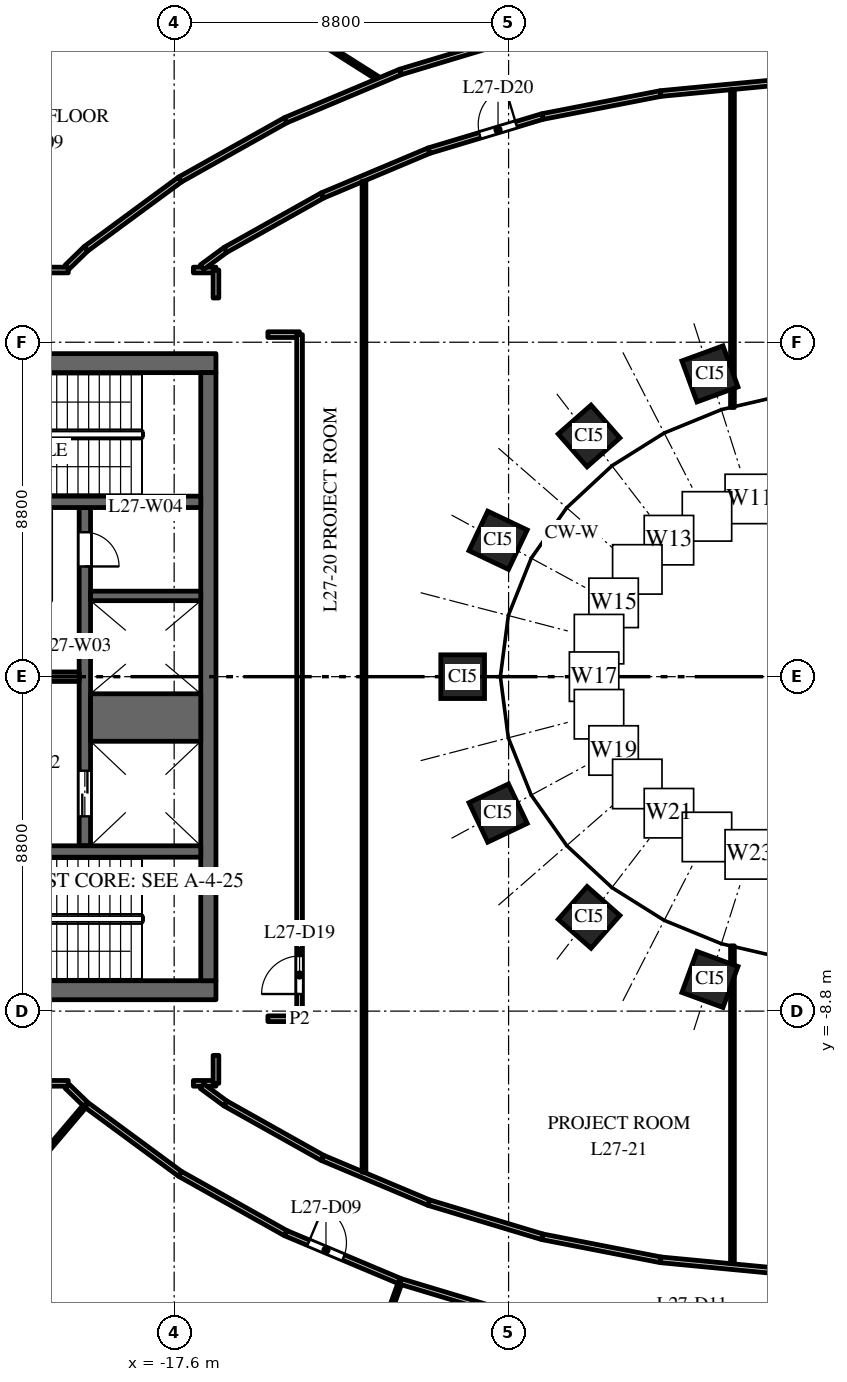
"""IFC4 building model, lengths in metres.
Left out: names, types, materials, properties, quantities, classifications, styles, units other than length and angle.
Written with IfcOpenShell. Run it as: python <this file> out.ifc"""

import sys

from ifc_helpers import new_model, si_unit, direction, frame, frame_2d, origin, origin_2d, place, context, subcontext, project, spatial, rectangle, extrude, element, fill, save


model = new_model("IFC4")
c1 = context("Model", 3, precision=1e-05, world=origin(), true_north=direction((0.0, 1.0)))
c2 = subcontext(c1, "Body", "Model", "MODEL_VIEW")
j1 = project(units=[si_unit("LENGTHUNIT", "METRE"), si_unit("PLANEANGLEUNIT", "RADIAN")], contexts=[c1])
p1 = place(None, origin())
s1 = spatial("IfcSite", under=j1, at=p1, CompositionType="ELEMENT")
p2 = place(p1, origin())
s2 = spatial("IfcBuilding", under=s1, at=p2, CompositionType="ELEMENT")
p3 = place(p2, frame((0.0, 0.0, 120.0)))
s3 = spatial("IfcBuildingStorey", under=s2, at=p3, CompositionType="ELEMENT", Elevation=120.0)
for number, where, z_axis, x_axis in (
    (1, (-3.501, 7.967, 0.0), (0.0, 0.0, 1.0), (-0.939, -0.344, 0.0)),
    (2, (-6.682, 6.334, 0.0), (0.0, 0.0, 1.0), (-0.751, -0.66, 0.0)),
    (3, (-9.076, 3.588, 0.0), (0.0, 0.0, 1.0), (-0.429, -0.903, 0.0)),
    (4, (-10.008, 0.0, 0.0), (0.0, 0.0, 1.0), (0.0, -1.0, 0.0)),
    (5, (-9.076, -3.588, 0.0), (0.0, 0.0, 1.0), (0.429, -0.903, 0.0)),
    (6, (-6.682, -6.334, 0.0), (0.0, 0.0, 1.0), (0.751, -0.66, 0.0)),
    (7, (-3.501, -7.967, 0.0), (0.0, 0.0, 1.0), (0.939, -0.344, 0.0)),
):
    element("IfcColumn", number, at=place(p3, frame(where, z_axis=z_axis, x_axis=x_axis)), inside=s3, PredefinedType="COLUMN", context=c2, shape_type="SweptSolid", body=[
        extrude(rectangle(XDim=1.15, YDim=1.15, at=origin_2d()), origin(), (0.0, 0.0, 1.0), 4.0),
    ])
p4 = place(p3, frame((-16.5, 8.25, 0.0), z_axis=(0.0, 0.0, 1.0), x_axis=(-1.0, 0.0, 0.0)))
e8 = element("IfcWall", 8, at=p4, inside=s3, PredefinedType="SHEAR", context=c2, shape_type="SweptSolid", body=[
    extrude(rectangle(XDim=15.0, YDim=0.5, at=frame_2d((7.5, 0.0))), origin(), (0.0, 0.0, 1.0), 3.7),
])
p5 = place(p4, frame((6.9, 0.0, 0.0)))
e9 = element("IfcOpeningElement", 9, at=p5, cuts=e8, PredefinedType="OPENING", context=c2, shape_type="SweptSolid", body=[
    extrude(rectangle(XDim=1.2, YDim=2.1, at=frame_2d((0.6, 1.05))), frame((0.0, 0.26, 0.0), z_axis=(0.0, -1.0, 0.0), x_axis=(1.0, 0.0, 0.0)), (0.0, 0.0, 1.0), 0.52),
])
p6 = place(p4, frame((12.05, 0.0, 0.0)))
e10 = element("IfcOpeningElement", 10, at=p6, cuts=e8, PredefinedType="OPENING", context=c2, shape_type="SweptSolid", body=[
    extrude(rectangle(XDim=0.9, YDim=2.1, at=frame_2d((0.45, 1.05))), frame((0.0, 0.26, 0.0), z_axis=(0.0, -1.0, 0.0), x_axis=(1.0, 0.0, 0.0)), (0.0, 0.0, 1.0), 0.52),
])
p7 = place(p3, frame((-16.5, -8.25, 0.0), z_axis=(0.0, 0.0, 1.0), x_axis=(-1.0, 0.0, 0.0)))
e11 = element("IfcWall", 11, at=p7, inside=s3, PredefinedType="SHEAR", context=c2, shape_type="SweptSolid", body=[
    extrude(rectangle(XDim=15.0, YDim=0.5, at=frame_2d((7.5, 0.0))), origin(), (0.0, 0.0, 1.0), 3.7),
])
p8 = place(p7, frame((6.9, 0.0, 0.0)))
e12 = element("IfcOpeningElement", 12, at=p8, cuts=e11, PredefinedType="OPENING", context=c2, shape_type="SweptSolid", body=[
    extrude(rectangle(XDim=1.2, YDim=2.1, at=frame_2d((0.6, 1.05))), frame((0.0, 0.26, 0.0), z_axis=(0.0, -1.0, 0.0), x_axis=(1.0, 0.0, 0.0)), (0.0, 0.0, 1.0), 0.52),
])
p9 = place(p7, frame((12.05, 0.0, 0.0)))
e13 = element("IfcOpeningElement", 13, at=p9, cuts=e11, PredefinedType="OPENING", context=c2, shape_type="SweptSolid", body=[
    extrude(rectangle(XDim=0.9, YDim=2.1, at=frame_2d((0.45, 1.05))), frame((0.0, 0.26, 0.0), z_axis=(0.0, -1.0, 0.0), x_axis=(1.0, 0.0, 0.0)), (0.0, 0.0, 1.0), 0.52),
])
p10 = place(p3, frame((-19.95, -4.45, 0.0), z_axis=(0.0, 0.0, 1.0), x_axis=(0.0, 1.0, 0.0)))
e14 = element("IfcWall", 14, at=p10, inside=s3, PredefinedType="SHEAR", context=c2, shape_type="SweptSolid", body=[
    extrude(rectangle(XDim=8.9, YDim=0.3, at=frame_2d((4.45, 0.0))), origin(), (0.0, 0.0, 1.0), 3.7),
])
p11 = place(p10, frame((0.775, 0.0, 0.0)))
e15 = element("IfcOpeningElement", 15, at=p11, cuts=e14, PredefinedType="OPENING", context=c2, shape_type="SweptSolid", body=[
    extrude(rectangle(XDim=1.2, YDim=2.1, at=frame_2d((0.6, 1.05))), frame((0.0, 0.16, 0.0), z_axis=(0.0, -1.0, 0.0), x_axis=(1.0, 0.0, 0.0)), (0.0, 0.0, 1.0), 0.32),
])
p12 = place(p10, frame((7.35, 0.0, 0.0)))
e16 = element("IfcOpeningElement", 16, at=p12, cuts=e14, PredefinedType="OPENING", context=c2, shape_type="SweptSolid", body=[
    extrude(rectangle(XDim=0.9, YDim=2.1, at=frame_2d((0.45, 1.05))), frame((0.0, 0.16, 0.0), z_axis=(0.0, -1.0, 0.0), x_axis=(1.0, 0.0, 0.0)), (0.0, 0.0, 1.0), 0.32),
])
p13 = place(p3, frame((-20.1, 0.0, 0.0), z_axis=(0.0, 0.0, 1.0), x_axis=(-1.0, 0.0, 0.0)))
e17 = element("IfcWall", 17, at=p13, inside=s3, PredefinedType="SHEAR", context=c2, shape_type="SweptSolid", body=[
    extrude(rectangle(XDim=3.28, YDim=0.25, at=frame_2d((1.64, 0.0))), origin(), (0.0, 0.0, 1.0), 3.7),
])
p14 = place(p3, frame((-16.7, -8.0, 0.0), z_axis=(0.0, 0.0, 1.0), x_axis=(0.0, 1.0, 0.0)))
e18 = element("IfcWall", 18, at=p14, inside=s3, PredefinedType="SHEAR", context=c2, shape_type="SweptSolid", body=[
    extrude(rectangle(XDim=16.0, YDim=0.4, at=frame_2d((8.0, 0.0))), origin(), (0.0, 0.0, 1.0), 3.7),
])
p15 = place(p3, frame((-16.9, -1.075, 0.0), z_axis=(0.0, 0.0, 1.0), x_axis=(-1.0, 0.0, 0.0)))
e19 = element("IfcWall", 19, at=p15, inside=s3, PredefinedType="SHEAR", context=c2, shape_type="SweptSolid", body=[
    extrude(rectangle(XDim=2.9, YDim=1.25, at=frame_2d((1.45, 0.0))), origin(), (0.0, 0.0, 1.0), 3.7),
])
p16 = place(p3, frame((-16.9, 2.125, 0.0), z_axis=(0.0, 0.0, 1.0), x_axis=(-1.0, 0.0, 0.0)))
e20 = element("IfcWall", 20, at=p16, inside=s3, PredefinedType="SHEAR", context=c2, shape_type="SweptSolid", body=[
    extrude(rectangle(XDim=2.9, YDim=0.25, at=frame_2d((1.45, 0.0))), origin(), (0.0, 0.0, 1.0), 3.7),
])
p17 = place(p3, frame((-16.9, 4.6, 0.0), z_axis=(0.0, 0.0, 1.0), x_axis=(-1.0, 0.0, 0.0)))
e21 = element("IfcWall", 21, at=p17, inside=s3, PredefinedType="SHEAR", context=c2, shape_type="SweptSolid", body=[
    extrude(rectangle(XDim=6.18, YDim=0.3, at=frame_2d((3.09, 0.0))), origin(), (0.0, 0.0, 1.0), 3.7),
])
p18 = place(p17, frame((4.9, 0.0, 0.0)))
e22 = element("IfcOpeningElement", 22, at=p18, cuts=e21, PredefinedType="OPENING", context=c2, shape_type="SweptSolid", body=[
    extrude(rectangle(XDim=1.1, YDim=2.1, at=frame_2d((0.55, 1.05))), frame((0.0, 0.16, 0.0), z_axis=(0.0, -1.0, 0.0), x_axis=(1.0, 0.0, 0.0)), (0.0, 0.0, 1.0), 0.32),
])
p19 = place(p3, frame((-16.9, -4.6, 0.0), z_axis=(0.0, 0.0, 1.0), x_axis=(-1.0, 0.0, 0.0)))
e23 = element("IfcWall", 23, at=p19, inside=s3, PredefinedType="SHEAR", context=c2, shape_type="SweptSolid", body=[
    extrude(rectangle(XDim=6.18, YDim=0.3, at=frame_2d((3.09, 0.0))), origin(), (0.0, 0.0, 1.0), 3.7),
])
p20 = place(p19, frame((4.9, 0.0, 0.0)))
e24 = element("IfcOpeningElement", 24, at=p20, cuts=e23, PredefinedType="OPENING", context=c2, shape_type="SweptSolid", body=[
    extrude(rectangle(XDim=1.1, YDim=2.1, at=frame_2d((0.55, 1.05))), frame((0.0, 0.16, 0.0), z_axis=(0.0, -1.0, 0.0), x_axis=(1.0, 0.0, 0.0)), (0.0, 0.0, 1.0), 0.32),
])
p21 = place(p3, frame((-31.5, -10.7, 0.0), z_axis=(0.0, 0.0, 1.0), x_axis=(1.0, 0.0, 0.0)))
e25 = element("IfcWall", 25, at=p21, inside=s3, PredefinedType="PARTITIONING", context=c2, shape_type="SweptSolid", body=[
    extrude(rectangle(XDim=11.113, YDim=0.15, at=frame_2d((5.557, 0.0))), origin(), (0.0, 0.0, 1.0), 3.1),
])
p22 = place(p21, frame((2.9, 0.0, 0.0)))
e26 = element("IfcOpeningElement", 26, at=p22, cuts=e25, PredefinedType="OPENING", context=c2, shape_type="SweptSolid", body=[
    extrude(rectangle(XDim=1.0, YDim=2.1, at=frame_2d((0.5, 1.05))), frame((0.0, 0.085, 0.0), z_axis=(0.0, -1.0, 0.0), x_axis=(1.0, 0.0, 0.0)), (0.0, 0.0, 1.0), 0.17),
])
p23 = place(p21, frame((5.856, 0.0, 0.0)))
e27 = element("IfcOpeningElement", 27, at=p23, cuts=e25, PredefinedType="OPENING", context=c2, shape_type="SweptSolid", body=[
    extrude(rectangle(XDim=1.0, YDim=2.1, at=frame_2d((0.5, 1.05))), frame((0.0, 0.085, 0.0), z_axis=(0.0, -1.0, 0.0), x_axis=(1.0, 0.0, 0.0)), (0.0, 0.0, 1.0), 0.17),
])
p24 = place(p3, frame((-26.43, -18.945, 0.0), z_axis=(0.0, 0.0, 1.0), x_axis=(0.64633128205, 0.763056927, 0.0)))
e28 = element("IfcWall", 28, at=p24, inside=s3, PredefinedType="PARTITIONING", context=c2, shape_type="SweptSolid", body=[
    extrude(rectangle(XDim=10.069, YDim=0.1, at=frame_2d((5.034, 0.0))), origin(), (0.0, 0.0, 1.0), 3.7),
])
p25 = place(p3, frame((-23.584, 10.7, 0.0), z_axis=(0.0, 0.0, 1.0), x_axis=(1.0, 0.0, 0.0)))
e29 = element("IfcWall", 29, at=p25, inside=s3, PredefinedType="PARTITIONING", context=c2, shape_type="SweptSolid", body=[
    extrude(rectangle(XDim=3.197, YDim=0.15, at=frame_2d((1.599, 0.0))), origin(), (0.0, 0.0, 1.0), 3.7),
])
p26 = place(p25, frame((0.439, 0.0, 0.0)))
e30 = element("IfcOpeningElement", 30, at=p26, cuts=e29, PredefinedType="OPENING", context=c2, shape_type="SweptSolid", body=[
    extrude(rectangle(XDim=1.0, YDim=2.1, at=frame_2d((0.5, 1.05))), frame((0.0, 0.085, 0.0), z_axis=(0.0, -1.0, 0.0), x_axis=(1.0, 0.0, 0.0)), (0.0, 0.0, 1.0), 0.17),
])
p27 = place(p3, frame((-20.418, -10.775, 0.0), z_axis=(0.0, 0.0, 1.0), x_axis=(0.717145300924, -0.69692368116, 0.0)))
e31 = element("IfcWall", 31, at=p27, inside=s3, PredefinedType="PARTITIONING", context=c2, shape_type="SweptSolid", body=[
    extrude(rectangle(XDim=0.676, YDim=0.15, at=frame_2d((0.338, 0.0))), origin(), (0.0, 0.0, 1.0), 3.7),
])
p28 = place(p3, frame((-20.418, 10.775, 0.0), z_axis=(0.0, 0.0, 1.0), x_axis=(0.717033879939, 0.697038316751, 0.0)))
e32 = element("IfcWall", 32, at=p28, inside=s3, PredefinedType="PARTITIONING", context=c2, shape_type="SweptSolid", body=[
    extrude(rectangle(XDim=0.696, YDim=0.15, at=frame_2d((0.348, 0.0))), origin(), (0.0, 0.0, 1.0), 3.7),
])
p29 = place(p3, frame((-19.919, 11.26, 0.0), z_axis=(0.0, 0.0, 1.0), x_axis=(0.805185638843, 0.593022838516, 0.0)))
e33 = element("IfcWall", 33, at=p29, inside=s3, PredefinedType="PARTITIONING", context=c2, shape_type="SweptSolid", body=[
    extrude(rectangle(XDim=3.073, YDim=0.15, at=frame_2d((1.536, 0.0))), origin(), (0.0, 0.0, 1.0), 2.75),
])
p30 = place(p3, frame((-19.903, -11.272, 0.0), z_axis=(0.0, 0.0, 1.0), x_axis=(0.805228684186, -0.592964388613, 0.0)))
e34 = element("IfcWall", 34, at=p30, inside=s3, PredefinedType="PARTITIONING", context=c2, shape_type="SweptSolid", body=[
    extrude(rectangle(XDim=3.052, YDim=0.15, at=frame_2d((1.526, 0.0))), origin(), (0.0, 0.0, 1.0), 2.75),
])
for number, where, z_axis, x_axis in (
    (35, (-17.445, -13.082, 0.0), (0.0, 0.0, 1.0), (0.872, -0.489, 0.0)),
    (36, (-17.445, 13.082, 0.0), (0.0, 0.0, 1.0), (0.872, 0.489, 0.0)),
):
    element("IfcWall", number, at=place(p3, frame(where, z_axis=z_axis, x_axis=x_axis)), inside=s3, PredefinedType="PARTITIONING", context=c2, shape_type="SweptSolid", body=[
        extrude(rectangle(XDim=3.188, YDim=0.15, at=frame_2d((1.594, 0.0))), origin(), (0.0, 0.0, 1.0), 3.7),
    ])
p31 = place(p3, frame((-17.095, -10.7, 0.0), z_axis=(0.0, 0.0, 1.0), x_axis=(1.0, 0.0, 0.0)))
e37 = element("IfcWall", 37, at=p31, inside=s3, PredefinedType="PARTITIONING", context=c2, shape_type="SweptSolid", body=[
    extrude(rectangle(XDim=0.595, YDim=0.15, at=frame_2d((0.297, 0.0))), origin(), (0.0, 0.0, 1.0), 3.7),
])
p32 = place(p3, frame((-16.867, -10.775, 0.0), z_axis=(0.0, 0.0, 1.0), x_axis=(0.804751563869, -0.593611759023, 0.0)))
e38 = element("IfcWall", 38, at=p32, inside=s3, PredefinedType="PARTITIONING", context=c2, shape_type="SweptSolid", body=[
    extrude(rectangle(XDim=0.767, YDim=0.15, at=frame_2d((0.383, 0.0))), origin(), (0.0, 0.0, 1.0), 3.7),
])
p33 = place(p3, frame((-17.095, 10.7, 0.0), z_axis=(0.0, 0.0, 1.0), x_axis=(1.0, 0.0, 0.0)))
e39 = element("IfcWall", 39, at=p33, inside=s3, PredefinedType="PARTITIONING", context=c2, shape_type="SweptSolid", body=[
    extrude(rectangle(XDim=0.595, YDim=0.15, at=frame_2d((0.297, 0.0))), origin(), (0.0, 0.0, 1.0), 3.7),
])
p34 = place(p3, frame((-16.867, 10.775, 0.0), z_axis=(0.0, 0.0, 1.0), x_axis=(0.804751563869, 0.593611759023, 0.0)))
e40 = element("IfcWall", 40, at=p34, inside=s3, PredefinedType="PARTITIONING", context=c2, shape_type="SweptSolid", body=[
    extrude(rectangle(XDim=0.767, YDim=0.15, at=frame_2d((0.383, 0.0))), origin(), (0.0, 0.0, 1.0), 3.7),
])
p35 = place(p3, frame((-16.452, 18.412, 0.0), z_axis=(0.0, 0.0, 1.0), x_axis=(0.844845649947, -0.535010119312, 0.0)))
e41 = element("IfcWall", 41, at=p35, inside=s3, PredefinedType="PARTITIONING", context=c2, shape_type="SweptSolid", body=[
    extrude(rectangle(XDim=4.983, YDim=0.1, at=frame_2d((2.492, 0.0))), origin(), (0.0, 0.0, 1.0), 2.85),
])
for number, where, z_axis, x_axis in (
    (42, (-16.5, -10.7, 0.0), (0.0, 0.0, 1.0), (0.0, 1.0, 0.0)),
    (43, (-16.5, 9.964, 0.0), (0.0, 0.0, 1.0), (0.0, 1.0, 0.0)),
):
    element("IfcWall", number, at=place(p3, frame(where, z_axis=z_axis, x_axis=x_axis)), inside=s3, PredefinedType="PARTITIONING", context=c2, shape_type="SweptSolid", body=[
        extrude(rectangle(XDim=0.736, YDim=0.15, at=frame_2d((0.368, 0.0))), origin(), (0.0, 0.0, 1.0), 3.7),
    ])
for number, where, z_axis, x_axis in (
    (44, (-16.25, -11.23, 0.0), (0.0, 0.0, 1.0), (0.872, -0.489, 0.0)),
    (45, (-16.25, 11.23, 0.0), (0.0, 0.0, 1.0), (0.872, 0.489, 0.0)),
):
    element("IfcWall", number, at=place(p3, frame(where, z_axis=z_axis, x_axis=x_axis)), inside=s3, PredefinedType="PARTITIONING", context=c2, shape_type="SweptSolid", body=[
        extrude(rectangle(XDim=2.927, YDim=0.15, at=frame_2d((1.464, 0.0))), origin(), (0.0, 0.0, 1.0), 2.75),
    ])
for number, where, z_axis, x_axis in (
    (46, (-15.134, -9.0, 0.0), (0.0, 0.0, 1.0), (1.0, 0.0, 0.0)),
    (47, (-15.134, 9.0, 0.0), (0.0, 0.0, 1.0), (1.0, 0.0, 0.0)),
):
    element("IfcWall", number, at=place(p3, frame(where, z_axis=z_axis, x_axis=x_axis)), inside=s3, PredefinedType="PARTITIONING", context=c2, shape_type="SweptSolid", body=[
        extrude(rectangle(XDim=0.834, YDim=0.15, at=frame_2d((0.417, 0.0))), origin(), (0.0, 0.0, 1.0), 3.7),
    ])
p36 = place(p3, frame((-14.665, -14.642, 0.0), z_axis=(0.0, 0.0, 1.0), x_axis=(0.921850993012, -0.387544509293, 0.0)))
e48 = element("IfcWall", 48, at=p36, inside=s3, PredefinedType="PARTITIONING", context=c2, shape_type="SweptSolid", body=[
    extrude(rectangle(XDim=3.259, YDim=0.15, at=frame_2d((1.629, 0.0))), origin(), (0.0, 0.0, 1.0), 2.85),
])
p37 = place(p36, frame((0.65, 0.0, 0.0)))
e49 = element("IfcOpeningElement", 49, at=p37, cuts=e48, PredefinedType="OPENING", context=c2, shape_type="SweptSolid", body=[
    extrude(rectangle(XDim=1.0, YDim=2.1, at=frame_2d((0.5, 1.05))), frame((0.0, 0.085, 0.0), z_axis=(0.0, -1.0, 0.0), x_axis=(1.0, 0.0, 0.0)), (0.0, 0.0, 1.0), 0.17),
])
p38 = place(p3, frame((-14.665, 14.642, 0.0), z_axis=(0.0, 0.0, 1.0), x_axis=(0.921789499058, 0.38769075231, 0.0)))
e50 = element("IfcWall", 50, at=p38, inside=s3, PredefinedType="PARTITIONING", context=c2, shape_type="SweptSolid", body=[
    extrude(rectangle(XDim=3.278, YDim=0.15, at=frame_2d((1.639, 0.0))), origin(), (0.0, 0.0, 1.0), 2.85),
])
p39 = place(p3, frame((-14.3, -9.0, 0.0), z_axis=(0.0, 0.0, 1.0), x_axis=(0.0, 1.0, 0.0)))
e51 = element("IfcWall", 51, at=p39, inside=s3, PredefinedType="PARTITIONING", context=c2, shape_type="SweptSolid", body=[
    extrude(rectangle(XDim=18.0, YDim=0.15, at=frame_2d((9.0, 0.0))), origin(), (0.0, 0.0, 1.0), 3.7),
])
p40 = place(p39, frame((0.65, 0.0, 0.0)))
e52 = element("IfcOpeningElement", 52, at=p40, cuts=e51, PredefinedType="OPENING", context=c2, shape_type="SweptSolid", body=[
    extrude(rectangle(XDim=1.0, YDim=2.1, at=frame_2d((0.5, 1.05))), frame((0.0, 0.085, 0.0), z_axis=(0.0, -1.0, 0.0), x_axis=(1.0, 0.0, 0.0)), (0.0, 0.0, 1.0), 0.17),
])
for number, where, z_axis, x_axis in (
    (53, (-13.697, -12.662, 0.0), (0.0, 0.0, 1.0), (0.922, -0.388, 0.0)),
    (54, (-13.697, 12.662, 0.0), (0.0, 0.0, 1.0), (0.922, 0.388, 0.0)),
):
    element("IfcWall", number, at=place(p3, frame(where, z_axis=z_axis, x_axis=x_axis)), inside=s3, PredefinedType="PARTITIONING", context=c2, shape_type="SweptSolid", body=[
        extrude(rectangle(XDim=3.038, YDim=0.15, at=frame_2d((1.519, 0.0))), origin(), (0.0, 0.0, 1.0), 2.85),
    ])
p41 = place(p3, frame((-13.23, -20.327, 0.0), z_axis=(0.0, 0.0, 1.0), x_axis=(0.338411379185, 0.940998266969, 0.0)))
e55 = element("IfcWall", 55, at=p41, inside=s3, PredefinedType="PARTITIONING", context=c2, shape_type="SweptSolid", body=[
    extrude(rectangle(XDim=4.687, YDim=0.1, at=frame_2d((2.343, 0.0))), origin(), (0.0, 0.0, 1.0), 3.7),
])
p42 = place(p3, frame((-12.605, -13.036, 0.0), z_axis=(0.0, 0.0, 1.0), x_axis=(0.0, 1.0, 0.0)))
e56 = element("IfcWall", 56, at=p42, inside=s3, PredefinedType="PARTITIONING", context=c2, shape_type="SweptSolid", body=[
    extrude(rectangle(XDim=26.072, YDim=0.1, at=frame_2d((13.036, 0.0))), origin(), (0.0, 0.0, 1.0), 2.75),
])
for number, where, z_axis, x_axis in (
    (57, (-11.643, -15.913, 0.0), (0.0, 0.0, 1.0), (0.958, -0.288, 0.0)),
    (58, (-11.643, 15.913, 0.0), (0.0, 0.0, 1.0), (0.958, 0.288, 0.0)),
):
    element("IfcWall", number, at=place(p3, frame(where, z_axis=z_axis, x_axis=x_axis)), inside=s3, PredefinedType="PARTITIONING", context=c2, shape_type="SweptSolid", body=[
        extrude(rectangle(XDim=3.345, YDim=0.15, at=frame_2d((1.672, 0.0))), origin(), (0.0, 0.0, 1.0), 3.7),
    ])
p43 = place(p3, frame((-10.897, -13.84, 0.0), z_axis=(0.0, 0.0, 1.0), x_axis=(0.957606118849, -0.28808075455, 0.0)))
e59 = element("IfcWall", 59, at=p43, inside=s3, PredefinedType="PARTITIONING", context=c2, shape_type="SweptSolid", body=[
    extrude(rectangle(XDim=3.117, YDim=0.15, at=frame_2d((1.559, 0.0))), origin(), (0.0, 0.0, 1.0), 3.7),
])
p44 = place(p3, frame((-10.897, 13.84, 0.0), z_axis=(0.0, 0.0, 1.0), x_axis=(0.957606118849, 0.28808075455, 0.0)))
e60 = element("IfcWall", 60, at=p44, inside=s3, PredefinedType="PARTITIONING", context=c2, shape_type="SweptSolid", body=[
    extrude(rectangle(XDim=3.117, YDim=0.15, at=frame_2d((1.559, 0.0))), origin(), (0.0, 0.0, 1.0), 3.7),
])
p45 = place(p44, frame((1.4, 0.0, 0.0)))
e61 = element("IfcOpeningElement", 61, at=p45, cuts=e60, PredefinedType="OPENING", context=c2, shape_type="SweptSolid", body=[
    extrude(rectangle(XDim=1.0, YDim=2.1, at=frame_2d((0.5, 1.05))), frame((0.0, 0.085, 0.0), z_axis=(0.0, -1.0, 0.0), x_axis=(1.0, 0.0, 0.0)), (0.0, 0.0, 1.0), 0.17),
])
for number, where, z_axis, x_axis in (
    (62, (-7.912, -14.738, 0.0), (0.0, 0.0, 1.0), (0.982, -0.191, 0.0)),
    (63, (-7.912, 14.738, 0.0), (0.0, 0.0, 1.0), (0.982, 0.191, 0.0)),
):
    element("IfcWall", number, at=place(p3, frame(where, z_axis=z_axis, x_axis=x_axis)), inside=s3, PredefinedType="PARTITIONING", context=c2, shape_type="SweptSolid", body=[
        extrude(rectangle(XDim=3.172, YDim=0.15, at=frame_2d((1.586, 0.0))), origin(), (0.0, 0.0, 1.0), 2.85),
    ])
for number, where, z_axis, x_axis in (
    (64, (-4.798, -15.344, 0.0), (0.0, 0.0, 1.0), (0.995, -0.095, 0.0)),
    (65, (-4.798, 15.344, 0.0), (0.0, 0.0, 1.0), (0.995, 0.095, 0.0)),
):
    element("IfcWall", number, at=place(p3, frame(where, z_axis=z_axis, x_axis=x_axis)), inside=s3, PredefinedType="PARTITIONING", context=c2, shape_type="SweptSolid", body=[
        extrude(rectangle(XDim=3.205, YDim=0.15, at=frame_2d((1.602, 0.0))), origin(), (0.0, 0.0, 1.0), 3.7),
    ])
for number, where, z_axis, x_axis in (
    (66, (-2.909, -15.445, 0.0), (0.0, 0.0, 1.0), (0.0, 1.0, 0.0)),
    (67, (-2.909, 7.082, 0.0), (0.0, 0.0, 1.0), (0.0, 1.0, 0.0)),
):
    element("IfcWall", number, at=place(p3, frame(where, z_axis=z_axis, x_axis=x_axis)), inside=s3, PredefinedType="PARTITIONING", context=c2, shape_type="SweptSolid", body=[
        extrude(rectangle(XDim=8.363, YDim=0.1, at=frame_2d((4.182, 0.0))), origin(), (0.0, 0.0, 1.0), 2.9),
    ])
p46 = place(p11, origin())
e68 = element("IfcDoor", 68, at=p46, inside=s3, OperationType="DOUBLE_DOOR_SLIDING", PredefinedType="DOOR", context=c2, shape_type="SweptSolid", body=[
    extrude(rectangle(XDim=1.2, YDim=2.1, at=frame_2d((0.6, 1.05))), frame((0.0, 0.025, 0.0), z_axis=(0.0, -1.0, 0.0), x_axis=(1.0, 0.0, 0.0)), (0.0, 0.0, 1.0), 0.05),
])
fill(e15, e68)
p47 = place(p12, origin())
e69 = element("IfcDoor", 69, at=p47, inside=s3, OperationType="SINGLE_SWING_LEFT", PredefinedType="DOOR", context=c2, shape_type="SweptSolid", body=[
    extrude(rectangle(XDim=0.9, YDim=2.1, at=frame_2d((0.45, 1.05))), frame((0.0, 0.025, 0.0), z_axis=(0.0, -1.0, 0.0), x_axis=(1.0, 0.0, 0.0)), (0.0, 0.0, 1.0), 0.05),
])
fill(e16, e69)
p48 = place(p37, origin())
e70 = element("IfcDoor", 70, at=p48, inside=s3, OperationType="SINGLE_SWING_LEFT", PredefinedType="DOOR", context=c2, shape_type="SweptSolid", body=[
    extrude(rectangle(XDim=1.0, YDim=2.1, at=frame_2d((0.5, 1.05))), frame((0.0, 0.025, 0.0), z_axis=(0.0, -1.0, 0.0), x_axis=(1.0, 0.0, 0.0)), (0.0, 0.0, 1.0), 0.05),
])
fill(e49, e70)
p49 = place(p40, origin())
e71 = element("IfcDoor", 71, at=p49, inside=s3, OperationType="SINGLE_SWING_LEFT", PredefinedType="DOOR", context=c2, shape_type="SweptSolid", body=[
    extrude(rectangle(XDim=1.0, YDim=2.1, at=frame_2d((0.5, 1.05))), frame((0.0, 0.025, 0.0), z_axis=(0.0, -1.0, 0.0), x_axis=(1.0, 0.0, 0.0)), (0.0, 0.0, 1.0), 0.05),
])
fill(e52, e71)
p50 = place(p45, origin())
e72 = element("IfcDoor", 72, at=p50, inside=s3, OperationType="SINGLE_SWING_RIGHT", PredefinedType="DOOR", context=c2, shape_type="SweptSolid", body=[
    extrude(rectangle(XDim=1.0, YDim=2.1, at=frame_2d((0.5, 1.05))), frame((0.0, 0.025, 0.0), z_axis=(0.0, -1.0, 0.0), x_axis=(1.0, 0.0, 0.0)), (0.0, 0.0, 1.0), 0.05),
])
fill(e61, e72)
save(model, sys.argv[1])
